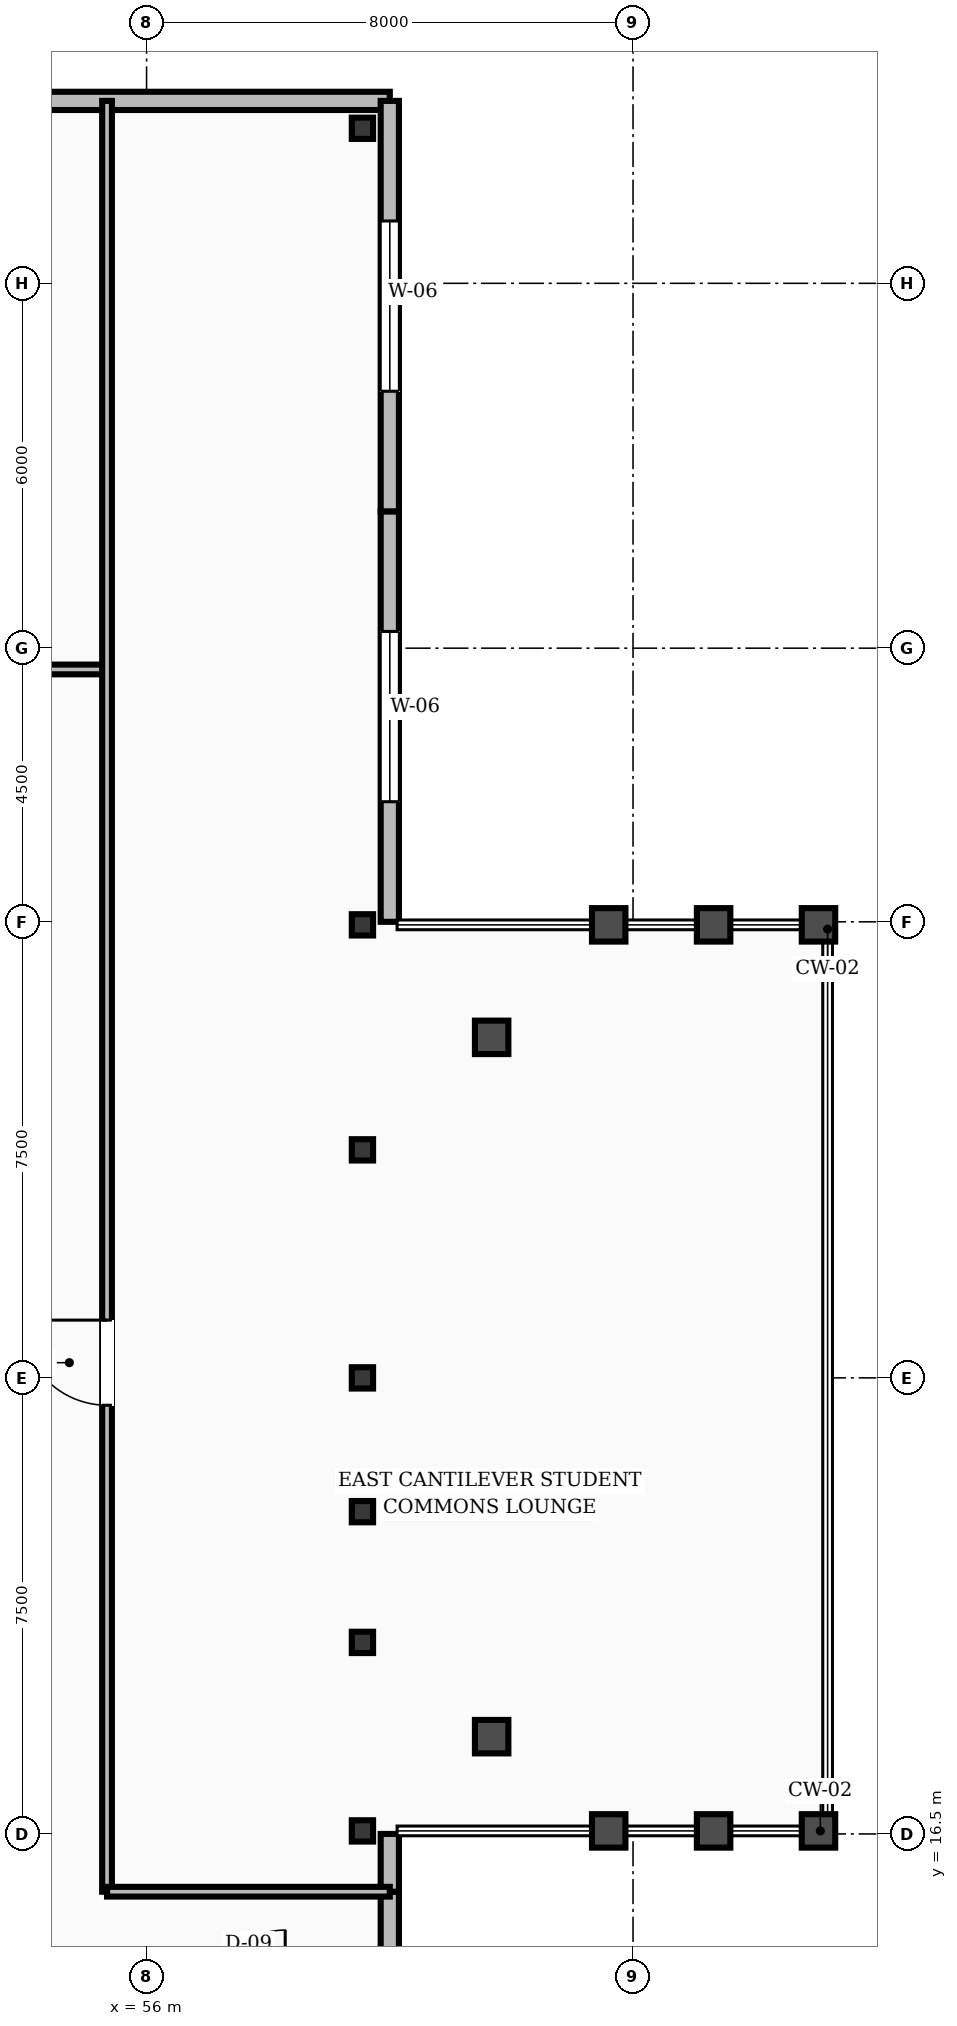
"""IFC4 building model, lengths in metres.
Left out: names, types, materials, properties, quantities, classifications, styles, units other than length and angle.
Written with IfcOpenShell. Run it as: python <this file> out.ifc"""

import sys

from ifc_helpers import new_model, si_unit, direction, frame, frame_2d, origin, origin_2d, place, context, subcontext, project, spatial, rectangle, hollow_rectangle, i_section, extrude, element, fill, save


model = new_model("IFC4")
c1 = context("Model", 3, precision=1e-05, world=origin(), true_north=direction((0.0, 1.0)))
c2 = subcontext(c1, "Body", "Model", "MODEL_VIEW")
j1 = project(units=[si_unit("LENGTHUNIT", "METRE"), si_unit("PLANEANGLEUNIT", "RADIAN")], contexts=[c1])
p1 = place(None, origin())
s1 = spatial("IfcSite", under=j1, at=p1, CompositionType="ELEMENT")
p2 = place(p1, origin())
s2 = spatial("IfcBuilding", under=s1, at=p2, CompositionType="ELEMENT")
p3 = place(p2, frame((0.0, 0.0, 10.0)))
s3 = spatial("IfcBuildingStorey", under=s2, at=p3, CompositionType="ELEMENT", Elevation=10.0)
for number, where, z_axis, x_axis in (
    (1, (59.55, 44.55, 0.0), (0.0, 0.0, 1.0), (1.0, 0.0, 0.0)),
    (2, (59.55, 16.55, 0.0), (0.0, 0.0, 1.0), (1.0, 0.0, 0.0)),
    (3, (59.55, 19.65, 0.0), (0.0, 0.0, 1.0), (1.0, 0.0, 0.0)),
    (4, (59.55, 24.0, 0.0), (0.0, 0.0, 1.0), (1.0, 0.0, 0.0)),
    (5, (59.55, 27.75, 0.0), (0.0, 0.0, 1.0), (1.0, 0.0, 0.0)),
    (6, (59.55, 31.45, 0.0), (0.0, 0.0, 1.0), (1.0, 0.0, 0.0)),
):
    element("IfcColumn", number, at=place(p3, frame(where, z_axis=z_axis, x_axis=x_axis)), inside=s3, PredefinedType="COLUMN", context=c2, shape_type="SweptSolid", body=[
        extrude(i_section(OverallWidth=0.35, OverallDepth=0.35, WebThickness=0.012, FlangeThickness=0.019, FilletRadius=0.016, at=origin_2d()), origin(), (0.0, 0.0, 1.0), 4.8),
    ])
p4 = place(p3, frame((59.55, 21.8, 0.0), z_axis=(0.0, 0.0, 1.0), x_axis=(1.0, 0.0, 0.0)))
e7 = element("IfcColumn", 7, at=p4, inside=s3, PredefinedType="PILASTER", context=c2, shape_type="SweptSolid", body=[
    extrude(hollow_rectangle(XDim=0.35, YDim=0.35, WallThickness=0.016, at=origin_2d()), origin(), (0.0, 0.0, 1.0), 4.8),
])
p5 = place(p3, frame((60.0, 45.0, 0.0), z_axis=(0.0, 0.0, 1.0), x_axis=(-1.0, 0.0, 0.0)))
e8 = element("IfcWall", 8, at=p5, inside=s3, PredefinedType="STANDARD", context=c2, shape_type="SweptSolid", body=[
    extrude(rectangle(XDim=8.0, YDim=0.3, at=frame_2d((4.0, 0.0))), origin(), (0.0, 0.0, 1.0), 3.57),
])
p6 = place(p3, frame((60.0, 13.72, 0.0), z_axis=(0.0, 0.0, 1.0), x_axis=(0.0, 1.0, 0.0)))
e9 = element("IfcWall", 9, at=p6, inside=s3, PredefinedType="STANDARD", context=c2, shape_type="SweptSolid", body=[
    extrude(rectangle(XDim=1.83, YDim=0.3, at=frame_2d((0.915, 0.0))), origin(), (0.0, 0.0, 1.0), 3.57),
])
p7 = place(p3, frame((60.0, 15.55, 0.0), z_axis=(0.0, 0.0, 1.0), x_axis=(0.0, 1.0, 0.0)))
e10 = element("IfcWall", 10, at=p7, inside=s3, PredefinedType="STANDARD", context=c2, shape_type="SweptSolid", body=[
    extrude(rectangle(XDim=0.95, YDim=0.3, at=frame_2d((0.475, 0.0))), origin(), (0.0, 0.0, 1.0), 3.57),
])
p8 = place(p3, frame((60.0, 31.5, 0.0), z_axis=(0.0, 0.0, 1.0), x_axis=(0.0, 1.0, 0.0)))
e11 = element("IfcWall", 11, at=p8, inside=s3, PredefinedType="STANDARD", context=c2, shape_type="SweptSolid", body=[
    extrude(rectangle(XDim=6.75, YDim=0.3, at=frame_2d((3.375, 0.0))), origin(), (0.0, 0.0, 1.0), 3.57),
])
p9 = place(p8, frame((1.975, 0.0, 0.85)))
e12 = element("IfcOpeningElement", 12, at=p9, cuts=e11, PredefinedType="OPENING", context=c2, shape_type="SweptSolid", body=[
    extrude(rectangle(XDim=2.8, YDim=2.3, at=frame_2d((1.4, 1.15))), frame((0.0, 0.16, 0.0), z_axis=(0.0, -1.0, 0.0), x_axis=(1.0, 0.0, 0.0)), (0.0, 0.0, 1.0), 0.32),
])
p10 = place(p3, frame((60.0, 38.25, 0.0), z_axis=(0.0, 0.0, 1.0), x_axis=(0.0, 1.0, 0.0)))
e13 = element("IfcWall", 13, at=p10, inside=s3, PredefinedType="STANDARD", context=c2, shape_type="SweptSolid", body=[
    extrude(rectangle(XDim=6.75, YDim=0.3, at=frame_2d((3.375, 0.0))), origin(), (0.0, 0.0, 1.0), 3.57),
])
p11 = place(p10, frame((1.975, 0.0, 0.85)))
e14 = element("IfcOpeningElement", 14, at=p11, cuts=e13, PredefinedType="OPENING", context=c2, shape_type="SweptSolid", body=[
    extrude(rectangle(XDim=2.8, YDim=2.3, at=frame_2d((1.4, 1.15))), frame((0.0, 0.16, 0.0), z_axis=(0.0, -1.0, 0.0), x_axis=(1.0, 0.0, 0.0)), (0.0, 0.0, 1.0), 0.32),
])
p12 = place(p3, frame((8.65, 35.65, 0.0), z_axis=(0.0, 0.0, 1.0), x_axis=(1.0, 0.0, 0.0)))
e15 = element("IfcWall", 15, at=p12, inside=s3, PredefinedType="SOLIDWALL", context=c2, shape_type="SweptSolid", body=[
    extrude(rectangle(XDim=46.7, YDim=0.16, at=frame_2d((23.35, 0.0))), origin(), (0.0, 0.0, 1.0), 3.52),
])
p13 = place(p12, frame((10.0, 0.0, 0.0)))
e16 = element("IfcOpeningElement", 16, at=p13, cuts=e15, PredefinedType="OPENING", context=c2, shape_type="SweptSolid", body=[
    extrude(rectangle(XDim=1.4, YDim=2.15, at=frame_2d((0.7, 1.075))), frame((0.0, 0.09, 0.0), z_axis=(0.0, -1.0, 0.0), x_axis=(1.0, 0.0, 0.0)), (0.0, 0.0, 1.0), 0.18),
])
p14 = place(p12, frame((28.0, 0.0, 0.0)))
e17 = element("IfcOpeningElement", 17, at=p14, cuts=e15, PredefinedType="OPENING", context=c2, shape_type="SweptSolid", body=[
    extrude(rectangle(XDim=1.2, YDim=2.1, at=frame_2d((0.6, 1.05))), frame((0.0, 0.09, 0.0), z_axis=(0.0, -1.0, 0.0), x_axis=(1.0, 0.0, 0.0)), (0.0, 0.0, 1.0), 0.18),
])
p15 = place(p12, frame((43.0, 0.0, 0.0)))
e18 = element("IfcOpeningElement", 18, at=p15, cuts=e15, PredefinedType="OPENING", context=c2, shape_type="SweptSolid", body=[
    extrude(rectangle(XDim=0.95, YDim=2.1, at=frame_2d((0.475, 1.05))), frame((0.0, 0.09, 0.0), z_axis=(0.0, -1.0, 0.0), x_axis=(1.0, 0.0, 0.0)), (0.0, 0.0, 1.0), 0.18),
])
p16 = place(p3, frame((55.35, 15.55, 0.0), z_axis=(0.0, 0.0, 1.0), x_axis=(0.0, 1.0, 0.0)))
e19 = element("IfcWall", 19, at=p16, inside=s3, PredefinedType="SOLIDWALL", context=c2, shape_type="SweptSolid", body=[
    extrude(rectangle(XDim=29.45, YDim=0.16, at=frame_2d((14.725, 0.0))), origin(), (0.0, 0.0, 1.0), 3.52),
])
p17 = place(p16, frame((8.0, 0.0, 0.0)))
e20 = element("IfcOpeningElement", 20, at=p17, cuts=e19, PredefinedType="OPENING", context=c2, shape_type="SweptSolid", body=[
    extrude(rectangle(XDim=1.4, YDim=2.15, at=frame_2d((0.7, 1.075))), frame((0.0, 0.09, 0.0), z_axis=(0.0, -1.0, 0.0), x_axis=(1.0, 0.0, 0.0)), (0.0, 0.0, 1.0), 0.18),
])
p18 = place(p3, frame((55.35, 15.55, 0.0), z_axis=(0.0, 0.0, 1.0), x_axis=(1.0, 0.0, 0.0)))
e21 = element("IfcWall", 21, at=p18, inside=s3, PredefinedType="SOLIDWALL", context=c2, shape_type="SweptSolid", body=[
    extrude(rectangle(XDim=4.65, YDim=0.16, at=frame_2d((2.325, 0.0))), origin(), (0.0, 0.0, 1.0), 3.52),
])
p19 = place(p9, origin())
e22 = element("IfcWindow", 22, at=p19, inside=s3, PartitioningType="SINGLE_PANEL", PredefinedType="WINDOW", context=c2, shape_type="SweptSolid", body=[
    extrude(rectangle(XDim=2.8, YDim=2.3, at=frame_2d((1.4, 1.15))), frame((0.0, 0.03, 0.0), z_axis=(0.0, -1.0, 0.0), x_axis=(1.0, 0.0, 0.0)), (0.0, 0.0, 1.0), 0.06),
])
fill(e12, e22)
p20 = place(p11, origin())
e23 = element("IfcWindow", 23, at=p20, inside=s3, PartitioningType="SINGLE_PANEL", PredefinedType="WINDOW", context=c2, shape_type="SweptSolid", body=[
    extrude(rectangle(XDim=2.8, YDim=2.3, at=frame_2d((1.4, 1.15))), frame((0.0, 0.03, 0.0), z_axis=(0.0, -1.0, 0.0), x_axis=(1.0, 0.0, 0.0)), (0.0, 0.0, 1.0), 0.06),
])
fill(e14, e23)
p21 = place(p17, origin())
e24 = element("IfcDoor", 24, at=p21, inside=s3, OperationType="SINGLE_SWING_RIGHT", PredefinedType="DOOR", context=c2, shape_type="SweptSolid", body=[
    extrude(rectangle(XDim=1.4, YDim=2.15, at=frame_2d((0.7, 1.075))), frame((0.0, 0.025, 0.0), z_axis=(0.0, -1.0, 0.0), x_axis=(1.0, 0.0, 0.0)), (0.0, 0.0, 1.0), 0.05),
])
fill(e20, e24)
save(model, sys.argv[1])
